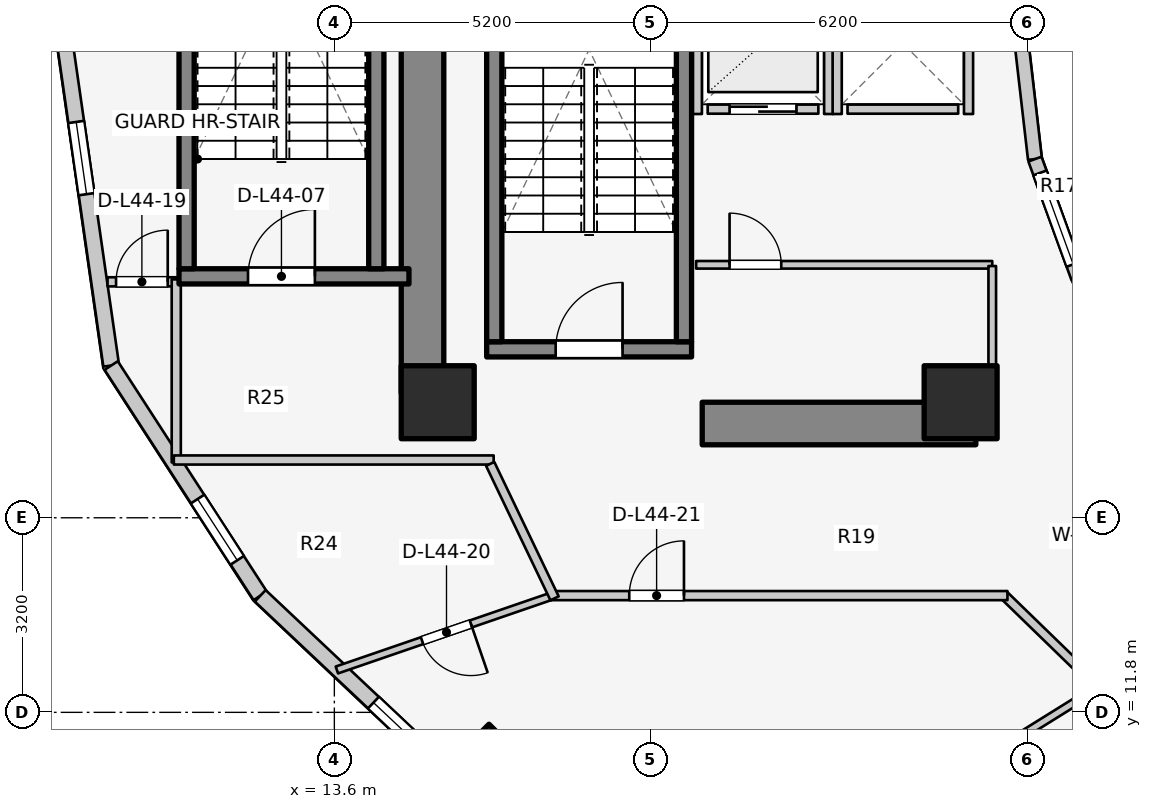
"""IFC4 building model, lengths in metres.
Left out: names, types, materials, properties, quantities, classifications, styles, units other than length and angle.
Written with IfcOpenShell. Run it as: python <this file> out.ifc"""

import sys

from ifc_helpers import new_model, si_unit, direction, frame, frame_2d, origin, origin_2d, place, context, subcontext, project, spatial, rectangle, extrude, element, fill, save


model = new_model("IFC4")
c1 = context("Model", 3, precision=1e-05, world=origin(), true_north=direction((0.0, 1.0)))
c2 = subcontext(c1, "Body", "Model", "MODEL_VIEW")
j1 = project(units=[si_unit("LENGTHUNIT", "METRE"), si_unit("PLANEANGLEUNIT", "RADIAN")], contexts=[c1])
p1 = place(None, origin())
s1 = spatial("IfcSite", under=j1, at=p1, CompositionType="ELEMENT")
p2 = place(p1, origin())
s2 = spatial("IfcBuilding", under=s1, at=p2, CompositionType="ELEMENT")
p3 = place(p2, frame((0.0, 0.0, 146.7)))
s3 = spatial("IfcBuildingStorey", under=s2, at=p3, CompositionType="ELEMENT", Elevation=146.7)
p4 = place(p3, frame((15.05, 17.05, 0.0), z_axis=(0.0, 0.0, 1.0), x_axis=(0.0, 1.0, 0.0)))
e1 = element("IfcWall", 1, at=p4, inside=s3, PredefinedType="SHEAR", context=c2, shape_type="SweptSolid", body=[
    extrude(rectangle(XDim=12.8, YDim=0.7, at=frame_2d((6.4, 0.0))), origin(), (0.0, 0.0, 1.0), 3.1),
])
p5 = place(p3, frame((19.65, 16.55, 0.0), z_axis=(0.0, 0.0, 1.0), x_axis=(1.0, 0.0, 0.0)))
e2 = element("IfcWall", 2, at=p5, inside=s3, PredefinedType="SHEAR", context=c2, shape_type="SweptSolid", body=[
    extrude(rectangle(XDim=4.5, YDim=0.7, at=frame_2d((2.25, 0.0))), origin(), (0.0, 0.0, 1.0), 3.1),
])
p6 = place(p3, frame((16.105, 17.77, 0.0), z_axis=(0.0, 0.0, 1.0), x_axis=(1.0, 0.0, 0.0)))
e3 = element("IfcWall", 3, at=p6, inside=s3, PredefinedType="SOLIDWALL", context=c2, shape_type="SweptSolid", body=[
    extrude(rectangle(XDim=3.37, YDim=0.25, at=frame_2d((1.685, 0.0))), origin(), (0.0, 0.0, 1.0), 3.1),
])
p7 = place(p6, frame((1.135, 0.0, 0.0)))
e4 = element("IfcOpeningElement", 4, at=p7, cuts=e3, PredefinedType="OPENING", context=c2, shape_type="SweptSolid", body=[
    extrude(rectangle(XDim=1.1, YDim=2.1, at=frame_2d((0.55, 1.05))), frame((0.0, 0.135, 0.0), z_axis=(0.0, -1.0, 0.0), x_axis=(1.0, 0.0, 0.0)), (0.0, 0.0, 1.0), 0.27),
])
for number, where, z_axis, x_axis in (
    (5, (16.23, 17.895, 0.0), (0.0, 0.0, 1.0), (0.0, 1.0, 0.0)),
    (6, (19.35, 17.895, 0.0), (0.0, 0.0, 1.0), (0.0, 1.0, 0.0)),
):
    element("IfcWall", number, at=place(p3, frame(where, z_axis=z_axis, x_axis=x_axis)), inside=s3, PredefinedType="SOLIDWALL", context=c2, shape_type="SweptSolid", body=[
        extrude(rectangle(XDim=7.81, YDim=0.25, at=frame_2d((3.905, 0.0))), origin(), (0.0, 0.0, 1.0), 3.1),
    ])
p8 = place(p3, frame((11.045, 18.97, 0.0), z_axis=(0.0, 0.0, 1.0), x_axis=(1.0, 0.0, 0.0)))
e7 = element("IfcWall", 7, at=p8, inside=s3, PredefinedType="SOLIDWALL", context=c2, shape_type="SweptSolid", body=[
    extrude(rectangle(XDim=3.782, YDim=0.25, at=frame_2d((1.891, 0.0))), origin(), (0.0, 0.0, 1.0), 3.1),
])
p9 = place(p8, frame((1.135, 0.0, 0.0)))
e8 = element("IfcOpeningElement", 8, at=p9, cuts=e7, PredefinedType="OPENING", context=c2, shape_type="SweptSolid", body=[
    extrude(rectangle(XDim=1.1, YDim=2.1, at=frame_2d((0.55, 1.05))), frame((0.0, 0.135, 0.0), z_axis=(0.0, -1.0, 0.0), x_axis=(1.0, 0.0, 0.0)), (0.0, 0.0, 1.0), 0.27),
])
for number, where, z_axis, x_axis in (
    (9, (11.17, 19.095, 0.0), (0.0, 0.0, 1.0), (0.0, 1.0, 0.0)),
    (10, (14.29, 19.095, 0.0), (0.0, 0.0, 1.0), (0.0, 1.0, 0.0)),
):
    element("IfcWall", number, at=place(p3, frame(where, z_axis=z_axis, x_axis=x_axis)), inside=s3, PredefinedType="SOLIDWALL", context=c2, shape_type="SweptSolid", body=[
        extrude(rectangle(XDim=7.81, YDim=0.25, at=frame_2d((3.905, 0.0))), origin(), (0.0, 0.0, 1.0), 3.1),
    ])
for number, where, z_axis, x_axis in (
    (11, (15.3, 16.9, 0.0), (0.0, 0.0, 1.0), (1.0, 0.0, 0.0)),
    (12, (23.9, 16.9, 0.0), (0.0, 0.0, 1.0), (1.0, 0.0, 0.0)),
):
    element("IfcColumn", number, at=place(p3, frame(where, z_axis=z_axis, x_axis=x_axis)), inside=s3, PredefinedType="COLUMN", context=c2, shape_type="SweptSolid", body=[
        extrude(rectangle(XDim=1.2, YDim=1.2, at=origin_2d()), origin(), (0.0, 0.0, 1.0), 3.1),
    ])
p10 = place(p3, frame((16.143, 10.969, 0.0), z_axis=(0.0, 0.0, 1.0), x_axis=(-0.707106781187, -0.707106781187, 0.0)))
e13 = element("IfcColumn", 13, at=p10, inside=s3, PredefinedType="COLUMN", context=c2, shape_type="SweptSolid", body=[
    extrude(rectangle(XDim=0.9, YDim=0.9, at=origin_2d()), origin(), (0.0, 0.0, 1.0), 3.1),
])
p11 = place(p3, frame((24.88, 23.0, 0.0), z_axis=(0.0, 0.0, 1.0), x_axis=(0.114711713601, -0.993398823617, 0.0)))
e14 = element("IfcWall", 14, at=p11, inside=s3, PredefinedType="STANDARD", context=c2, shape_type="SweptSolid", body=[
    extrude(rectangle(XDim=2.115, YDim=0.23, at=frame_2d((1.058, 0.0))), origin(), (0.0, 0.0, 1.0), 2.84),
])
p12 = place(p3, frame((25.123, 20.898, 0.0), z_axis=(0.0, 0.0, 1.0), x_axis=(0.341423187295, -0.93990968033, 0.0)))
e15 = element("IfcWall", 15, at=p12, inside=s3, PredefinedType="STANDARD", context=c2, shape_type="SweptSolid", body=[
    extrude(rectangle(XDim=2.084, YDim=0.23, at=frame_2d((1.042, 0.0))), origin(), (0.0, 0.0, 1.0), 2.84),
])
p13 = place(p12, frame((0.242, 0.0, 0.85)))
e16 = element("IfcOpeningElement", 16, at=p13, cuts=e15, PredefinedType="OPENING", context=c2, shape_type="SweptSolid", body=[
    extrude(rectangle(XDim=1.6, YDim=1.65, at=frame_2d((0.8, 0.825))), frame((0.0, 0.125, 0.0), z_axis=(0.0, -1.0, 0.0), x_axis=(1.0, 0.0, 0.0)), (0.0, 0.0, 1.0), 0.25),
])
p14 = place(p3, frame((9.14, 23.0, 0.0), z_axis=(0.0, 0.0, 1.0), x_axis=(0.142227632286, -0.989833976288, 0.0)))
e17 = element("IfcWall", 17, at=p14, inside=s3, PredefinedType="STANDARD", context=c2, shape_type="SweptSolid", body=[
    extrude(rectangle(XDim=5.553, YDim=0.26, at=frame_2d((2.776, 0.0))), origin(), (0.0, 0.0, 1.0), 2.85),
])
p15 = place(p14, frame((1.506, 0.0, 0.75)))
e18 = element("IfcOpeningElement", 18, at=p15, cuts=e17, PredefinedType="OPENING", context=c2, shape_type="SweptSolid", body=[
    extrude(rectangle(XDim=1.2, YDim=1.5, at=frame_2d((0.6, 0.75))), frame((0.0, 0.14, 0.0), z_axis=(0.0, -1.0, 0.0), x_axis=(1.0, 0.0, 0.0)), (0.0, 0.0, 1.0), 0.28),
])
p16 = place(p3, frame((9.93, 17.503, 0.0), z_axis=(0.0, 0.0, 1.0), x_axis=(0.543358984534, -0.839500454989, 0.0)))
e19 = element("IfcWall", 19, at=p16, inside=s3, PredefinedType="STANDARD", context=c2, shape_type="SweptSolid", body=[
    extrude(rectangle(XDim=4.511, YDim=0.26, at=frame_2d((2.256, 0.0))), origin(), (0.0, 0.0, 1.0), 2.85),
])
p17 = place(p16, frame((2.615, 0.0, 0.75)))
e20 = element("IfcOpeningElement", 20, at=p17, cuts=e19, PredefinedType="OPENING", context=c2, shape_type="SweptSolid", body=[
    extrude(rectangle(XDim=1.2, YDim=1.5, at=frame_2d((0.6, 0.75))), frame((0.0, 0.14, 0.0), z_axis=(0.0, -1.0, 0.0), x_axis=(1.0, 0.0, 0.0)), (0.0, 0.0, 1.0), 0.28),
])
p18 = place(p3, frame((12.381, 13.716, 0.0), z_axis=(0.0, 0.0, 1.0), x_axis=(0.727667301037, -0.68593024354, 0.0)))
e21 = element("IfcWall", 21, at=p18, inside=s3, PredefinedType="STANDARD", context=c2, shape_type="SweptSolid", body=[
    extrude(rectangle(XDim=4.604, YDim=0.26, at=frame_2d((2.302, 0.0))), origin(), (0.0, 0.0, 1.0), 2.85),
])
p19 = place(p18, frame((2.56, 0.0, 0.75)))
e22 = element("IfcOpeningElement", 22, at=p19, cuts=e21, PredefinedType="OPENING", context=c2, shape_type="SweptSolid", body=[
    extrude(rectangle(XDim=1.2, YDim=1.5, at=frame_2d((0.6, 0.75))), frame((0.0, 0.14, 0.0), z_axis=(0.0, -1.0, 0.0), x_axis=(1.0, 0.0, 0.0)), (0.0, 0.0, 1.0), 0.28),
])
p20 = place(p3, frame((19.74, 21.72, 0.0), z_axis=(0.0, 0.0, 1.0), x_axis=(1.0, 0.0, 0.0)))
e23 = element("IfcWall", 23, at=p20, inside=s3, PredefinedType="SOLIDWALL", context=c2, shape_type="SweptSolid", body=[
    extrude(rectangle(XDim=1.82, YDim=0.15, at=frame_2d((0.91, 0.0))), origin(), (0.0, 0.0, 1.0), 2.855),
])
p21 = place(p20, frame((0.36, 0.0, 0.0)))
e24 = element("IfcOpeningElement", 24, at=p21, cuts=e23, PredefinedType="OPENING", context=c2, shape_type="SweptSolid", body=[
    extrude(rectangle(XDim=1.1, YDim=2.1, at=frame_2d((0.55, 1.05))), frame((0.0, 0.085, 0.0), z_axis=(0.0, -1.0, 0.0), x_axis=(1.0, 0.0, 0.0)), (0.0, 0.0, 1.0), 0.17),
])
for number, where, z_axis, x_axis in (
    (25, (19.57, 21.64, 0.0), (0.0, 0.0, 1.0), (0.0, 1.0, 0.0)),
    (26, (21.73, 21.64, 0.0), (0.0, 0.0, 1.0), (0.0, 1.0, 0.0)),
):
    element("IfcWall", number, at=place(p3, frame(where, z_axis=z_axis, x_axis=x_axis)), inside=s3, PredefinedType="SOLIDWALL", context=c2, shape_type="SweptSolid", body=[
        extrude(rectangle(XDim=2.32, YDim=0.15, at=frame_2d((1.16, 0.0))), origin(), (0.0, 0.0, 1.0), 2.855),
    ])
p22 = place(p3, frame((22.04, 21.72, 0.0), z_axis=(0.0, 0.0, 1.0), x_axis=(1.0, 0.0, 0.0)))
e27 = element("IfcWall", 27, at=p22, inside=s3, PredefinedType="SOLIDWALL", context=c2, shape_type="SweptSolid", body=[
    extrude(rectangle(XDim=1.82, YDim=0.15, at=frame_2d((0.91, 0.0))), origin(), (0.0, 0.0, 1.0), 2.12),
])
p23 = place(p3, frame((21.87, 21.64, 0.0), z_axis=(0.0, 0.0, 1.0), x_axis=(0.0, 1.0, 0.0)))
e28 = element("IfcWall", 28, at=p23, inside=s3, PredefinedType="SOLIDWALL", context=c2, shape_type="SweptSolid", body=[
    extrude(rectangle(XDim=2.32, YDim=0.15, at=frame_2d((1.16, 0.0))), origin(), (0.0, 0.0, 1.0), 2.855),
])
p24 = place(p3, frame((24.03, 21.64, 0.0), z_axis=(0.0, 0.0, 1.0), x_axis=(0.0, 1.0, 0.0)))
e29 = element("IfcWall", 29, at=p24, inside=s3, PredefinedType="SOLIDWALL", context=c2, shape_type="SweptSolid", body=[
    extrude(rectangle(XDim=2.32, YDim=0.15, at=frame_2d((1.16, 0.0))), origin(), (0.0, 0.0, 1.0), 2.12),
])
p25 = place(p3, frame((19.55, 19.16, 0.0), z_axis=(0.0, 0.0, 1.0), x_axis=(1.0, 0.0, 0.0)))
e30 = element("IfcWall", 30, at=p25, inside=s3, PredefinedType="PARTITIONING", context=c2, shape_type="SweptSolid", body=[
    extrude(rectangle(XDim=4.87, YDim=0.125, at=frame_2d((2.435, 0.0))), origin(), (0.0, 0.0, 1.0), 2.12),
])
p26 = place(p25, frame((0.55, 0.0, 0.0)))
e31 = element("IfcOpeningElement", 31, at=p26, cuts=e30, PredefinedType="OPENING", context=c2, shape_type="SweptSolid", body=[
    extrude(rectangle(XDim=0.85, YDim=2.05, at=frame_2d((0.425, 1.025))), frame((0.0, 0.073, 0.0), z_axis=(0.0, -1.0, 0.0), x_axis=(1.0, 0.0, 0.0)), (0.0, 0.0, 1.0), 0.145),
])
p27 = place(p3, frame((24.42, 17.1, 0.0), z_axis=(0.0, 0.0, 1.0), x_axis=(0.0, 1.0, 0.0)))
e32 = element("IfcWall", 32, at=p27, inside=s3, PredefinedType="PARTITIONING", context=c2, shape_type="SweptSolid", body=[
    extrude(rectangle(XDim=2.04, YDim=0.125, at=frame_2d((1.02, 0.0))), origin(), (0.0, 0.0, 1.0), 2.232),
])
p28 = place(p3, frame((9.87, 18.88, 0.0), z_axis=(0.0, 0.0, 1.0), x_axis=(1.0, 0.0, 0.0)))
e33 = element("IfcWall", 33, at=p28, inside=s3, PredefinedType="PARTITIONING", context=c2, shape_type="SweptSolid", body=[
    extrude(rectangle(XDim=1.17, YDim=0.15, at=frame_2d((0.585, 0.0))), origin(), (0.0, 0.0, 1.0), 2.855),
])
p29 = place(p28, frame((0.14, 0.0, 0.0)))
e34 = element("IfcOpeningElement", 34, at=p29, cuts=e33, PredefinedType="OPENING", context=c2, shape_type="SweptSolid", body=[
    extrude(rectangle(XDim=0.85, YDim=2.05, at=frame_2d((0.425, 1.025))), frame((0.0, 0.085, 0.0), z_axis=(0.0, -1.0, 0.0), x_axis=(1.0, 0.0, 0.0)), (0.0, 0.0, 1.0), 0.17),
])
p30 = place(p3, frame((11.0, 15.91, 0.0), z_axis=(0.0, 0.0, 1.0), x_axis=(0.0, 1.0, 0.0)))
e35 = element("IfcWall", 35, at=p30, inside=s3, PredefinedType="PARTITIONING", context=c2, shape_type="SweptSolid", body=[
    extrude(rectangle(XDim=3.01, YDim=0.15, at=frame_2d((1.505, 0.0))), origin(), (0.0, 0.0, 1.0), 2.855),
])
p31 = place(p3, frame((10.96, 15.95, 0.0), z_axis=(0.0, 0.0, 1.0), x_axis=(1.0, 0.0, 0.0)))
e36 = element("IfcWall", 36, at=p31, inside=s3, PredefinedType="PARTITIONING", context=c2, shape_type="SweptSolid", body=[
    extrude(rectangle(XDim=5.26, YDim=0.15, at=frame_2d((2.63, 0.0))), origin(), (0.0, 0.0, 1.0), 2.22),
])
p32 = place(p3, frame((17.247, 13.736, 0.0), z_axis=(0.0, 0.0, 1.0), x_axis=(-0.945683523506, -0.325088716151, 0.0)))
e37 = element("IfcWall", 37, at=p32, inside=s3, PredefinedType="MOVABLE", context=c2, shape_type="SweptSolid", body=[
    extrude(rectangle(XDim=3.813, YDim=0.12, at=frame_2d((1.906, 0.0))), origin(), (0.0, 0.0, 1.0), 2.22),
])
p33 = place(p32, frame((1.481, 0.0, 0.0)))
e38 = element("IfcOpeningElement", 38, at=p33, cuts=e37, PredefinedType="OPENING", context=c2, shape_type="SweptSolid", body=[
    extrude(rectangle(XDim=0.85, YDim=2.05, at=frame_2d((0.425, 1.025))), frame((0.0, 0.07, 0.0), z_axis=(0.0, -1.0, 0.0), x_axis=(1.0, 0.0, 0.0)), (0.0, 0.0, 1.0), 0.14),
])
p34 = place(p3, frame((26.133, 12.251, 0.0), z_axis=(0.0, 0.0, 1.0), x_axis=(-0.717419568599, 0.696641344302, 0.0)))
e39 = element("IfcWall", 39, at=p34, inside=s3, PredefinedType="PARTITIONING", context=c2, shape_type="SweptSolid", body=[
    extrude(rectangle(XDim=2.138, YDim=0.15, at=frame_2d((1.069, 0.0))), origin(), (0.0, 0.0, 1.0), 2.299),
])
p35 = place(p3, frame((17.15, 13.72, 0.0), z_axis=(0.0, 0.0, 1.0), x_axis=(1.0, 0.0, 0.0)))
e40 = element("IfcWall", 40, at=p35, inside=s3, PredefinedType="PARTITIONING", context=c2, shape_type="SweptSolid", body=[
    extrude(rectangle(XDim=7.52, YDim=0.15, at=frame_2d((3.76, 0.0))), origin(), (0.0, 0.0, 1.0), 2.299),
])
p36 = place(p35, frame((1.3, 0.0, 0.0)))
e41 = element("IfcOpeningElement", 41, at=p36, cuts=e40, PredefinedType="OPENING", context=c2, shape_type="SweptSolid", body=[
    extrude(rectangle(XDim=0.9, YDim=2.1, at=frame_2d((0.45, 1.05))), frame((0.0, 0.085, 0.0), z_axis=(0.0, -1.0, 0.0), x_axis=(1.0, 0.0, 0.0)), (0.0, 0.0, 1.0), 0.17),
])
p37 = place(p3, frame((17.222, 13.675, 0.0), z_axis=(0.0, 0.0, 1.0), x_axis=(-0.431973389813, 0.901886351207, 0.0)))
e42 = element("IfcWall", 42, at=p37, inside=s3, PredefinedType="PARTITIONING", context=c2, shape_type="SweptSolid", body=[
    extrude(rectangle(XDim=2.452, YDim=0.15, at=frame_2d((1.226, 0.0))), origin(), (0.0, 0.0, 1.0), 2.855),
])
p38 = place(p3, frame((26.125, 12.184, 0.0), z_axis=(0.0, 0.0, 1.0), x_axis=(-0.849008457073, -0.528379257559, 0.0)))
e43 = element("IfcWall", 43, at=p38, inside=s3, PredefinedType="PARTITIONING", context=c2, shape_type="SweptSolid", body=[
    extrude(rectangle(XDim=7.077, YDim=0.125, at=frame_2d((3.539, 0.0))), origin(), (0.0, 0.0, 1.0), 2.299),
])
p39 = place(p13, origin())
e44 = element("IfcWindow", 44, at=p39, inside=s3, PartitioningType="SINGLE_PANEL", PredefinedType="WINDOW", context=c2, shape_type="SweptSolid", body=[
    extrude(rectangle(XDim=1.6, YDim=1.65, at=frame_2d((0.8, 0.825))), frame((0.0, 0.03, 0.0), z_axis=(0.0, -1.0, 0.0), x_axis=(1.0, 0.0, 0.0)), (0.0, 0.0, 1.0), 0.06),
])
fill(e16, e44)
p40 = place(p15, origin())
e45 = element("IfcWindow", 45, at=p40, inside=s3, PartitioningType="SINGLE_PANEL", PredefinedType="WINDOW", context=c2, shape_type="SweptSolid", body=[
    extrude(rectangle(XDim=1.2, YDim=1.5, at=frame_2d((0.6, 0.75))), frame((0.0, 0.03, 0.0), z_axis=(0.0, -1.0, 0.0), x_axis=(1.0, 0.0, 0.0)), (0.0, 0.0, 1.0), 0.06),
])
fill(e18, e45)
p41 = place(p17, origin())
e46 = element("IfcWindow", 46, at=p41, inside=s3, PartitioningType="SINGLE_PANEL", PredefinedType="WINDOW", context=c2, shape_type="SweptSolid", body=[
    extrude(rectangle(XDim=1.2, YDim=1.5, at=frame_2d((0.6, 0.75))), frame((0.0, 0.03, 0.0), z_axis=(0.0, -1.0, 0.0), x_axis=(1.0, 0.0, 0.0)), (0.0, 0.0, 1.0), 0.06),
])
fill(e20, e46)
p42 = place(p19, origin())
e47 = element("IfcWindow", 47, at=p42, inside=s3, PartitioningType="SINGLE_PANEL", PredefinedType="WINDOW", context=c2, shape_type="SweptSolid", body=[
    extrude(rectangle(XDim=1.2, YDim=1.5, at=frame_2d((0.6, 0.75))), frame((0.0, 0.03, 0.0), z_axis=(0.0, -1.0, 0.0), x_axis=(1.0, 0.0, 0.0)), (0.0, 0.0, 1.0), 0.06),
])
fill(e22, e47)
p43 = place(p7, origin())
e48 = element("IfcDoor", 48, at=p43, inside=s3, OperationType="SINGLE_SWING_RIGHT", PredefinedType="DOOR", context=c2, shape_type="SweptSolid", body=[
    extrude(rectangle(XDim=1.1, YDim=2.1, at=frame_2d((0.55, 1.05))), frame((0.0, 0.025, 0.0), z_axis=(0.0, -1.0, 0.0), x_axis=(1.0, 0.0, 0.0)), (0.0, 0.0, 1.0), 0.05),
])
fill(e4, e48)
p44 = place(p9, origin())
e49 = element("IfcDoor", 49, at=p44, inside=s3, OperationType="SINGLE_SWING_RIGHT", PredefinedType="DOOR", context=c2, shape_type="SweptSolid", body=[
    extrude(rectangle(XDim=1.1, YDim=2.1, at=frame_2d((0.55, 1.05))), frame((0.0, 0.025, 0.0), z_axis=(0.0, -1.0, 0.0), x_axis=(1.0, 0.0, 0.0)), (0.0, 0.0, 1.0), 0.05),
])
fill(e8, e49)
p45 = place(p21, origin())
e50 = element("IfcDoor", 50, at=p45, inside=s3, OperationType="DOUBLE_DOOR_SLIDING", PredefinedType="DOOR", context=c2, shape_type="SweptSolid", body=[
    extrude(rectangle(XDim=1.1, YDim=2.1, at=frame_2d((0.55, 1.05))), frame((0.0, 0.025, 0.0), z_axis=(0.0, -1.0, 0.0), x_axis=(1.0, 0.0, 0.0)), (0.0, 0.0, 1.0), 0.05),
])
fill(e24, e50)
p46 = place(p26, origin())
e51 = element("IfcDoor", 51, at=p46, inside=s3, OperationType="SINGLE_SWING_LEFT", PredefinedType="DOOR", context=c2, shape_type="SweptSolid", body=[
    extrude(rectangle(XDim=0.85, YDim=2.05, at=frame_2d((0.425, 1.025))), frame((0.0, 0.025, 0.0), z_axis=(0.0, -1.0, 0.0), x_axis=(1.0, 0.0, 0.0)), (0.0, 0.0, 1.0), 0.05),
])
fill(e31, e51)
p47 = place(p29, origin())
e52 = element("IfcDoor", 52, at=p47, inside=s3, OperationType="SINGLE_SWING_RIGHT", PredefinedType="DOOR", context=c2, shape_type="SweptSolid", body=[
    extrude(rectangle(XDim=0.85, YDim=2.05, at=frame_2d((0.425, 1.025))), frame((0.0, 0.025, 0.0), z_axis=(0.0, -1.0, 0.0), x_axis=(1.0, 0.0, 0.0)), (0.0, 0.0, 1.0), 0.05),
])
fill(e34, e52)
p48 = place(p33, origin())
e53 = element("IfcDoor", 53, at=p48, inside=s3, OperationType="SINGLE_SWING_LEFT", PredefinedType="DOOR", context=c2, shape_type="SweptSolid", body=[
    extrude(rectangle(XDim=0.85, YDim=2.05, at=frame_2d((0.425, 1.025))), frame((0.0, 0.025, 0.0), z_axis=(0.0, -1.0, 0.0), x_axis=(1.0, 0.0, 0.0)), (0.0, 0.0, 1.0), 0.05),
])
fill(e38, e53)
p49 = place(p36, origin())
e54 = element("IfcDoor", 54, at=p49, inside=s3, OperationType="SINGLE_SWING_RIGHT", PredefinedType="DOOR", context=c2, shape_type="SweptSolid", body=[
    extrude(rectangle(XDim=0.9, YDim=2.1, at=frame_2d((0.45, 1.05))), frame((0.0, 0.025, 0.0), z_axis=(0.0, -1.0, 0.0), x_axis=(1.0, 0.0, 0.0)), (0.0, 0.0, 1.0), 0.05),
])
fill(e41, e54)
save(model, sys.argv[1])
